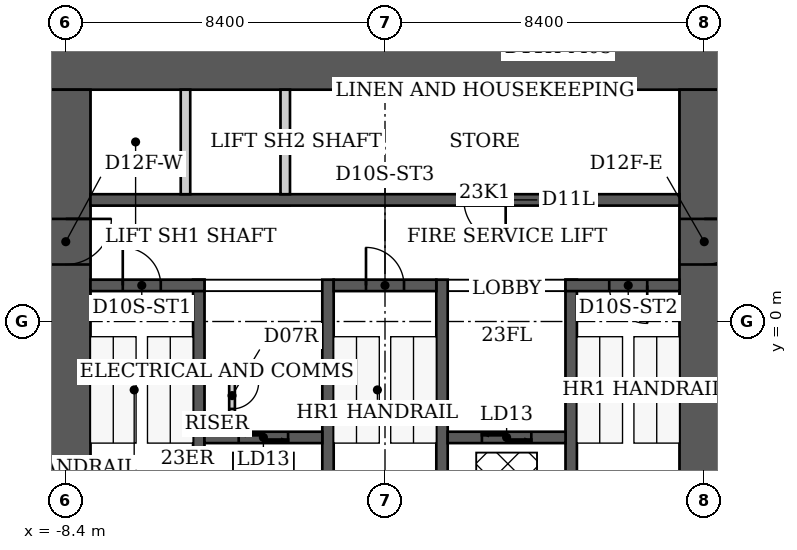
"""IFC4 building model, lengths in metres.
Left out: names, types, materials, properties, quantities, classifications, styles, units other than length and angle.
Written with IfcOpenShell. Run it as: python <this file> out.ifc"""

import sys

from ifc_helpers import new_model, si_unit, direction, frame, frame_2d, origin, place, context, subcontext, project, spatial, rectangle, extrude, element, fill, save


model = new_model("IFC4")
c1 = context("Model", 3, precision=1e-05, world=origin(), true_north=direction((0.0, 1.0)))
c2 = subcontext(c1, "Body", "Model", "MODEL_VIEW")
j1 = project(units=[si_unit("LENGTHUNIT", "METRE"), si_unit("PLANEANGLEUNIT", "RADIAN")], contexts=[c1])
p1 = place(None, origin())
s1 = spatial("IfcSite", under=j1, at=p1, CompositionType="ELEMENT")
p2 = place(p1, origin())
s2 = spatial("IfcBuilding", under=s1, at=p2, CompositionType="ELEMENT")
p3 = place(p2, frame((0.0, 0.0, 96.8)))
s3 = spatial("IfcBuildingStorey", under=s2, at=p3, CompositionType="ELEMENT", Elevation=96.8)
p4 = place(p3, frame((-9.05, 6.75, 0.0), z_axis=(0.0, 0.0, 1.0), x_axis=(1.0, 0.0, 0.0)))
e1 = element("IfcWall", 1, at=p4, inside=s3, PredefinedType="SHEAR", context=c2, shape_type="SweptSolid", body=[
    extrude(rectangle(XDim=18.1, YDim=1.3, at=frame_2d((9.05, 0.0))), origin(), (0.0, 0.0, 1.0), 3.8),
])
p5 = place(p3, frame((-8.4, -9.2, 0.0), z_axis=(0.0, 0.0, 1.0), x_axis=(0.0, 1.0, 0.0)))
e2 = element("IfcWall", 2, at=p5, inside=s3, PredefinedType="SHEAR", context=c2, shape_type="SweptSolid", body=[
    extrude(rectangle(XDim=15.3, YDim=1.3, at=frame_2d((7.65, 0.0))), origin(), (0.0, 0.0, 1.0), 3.8),
])
p6 = place(p5, frame((10.7, 0.0, 0.0)))
e3 = element("IfcOpeningElement", 3, at=p6, cuts=e2, PredefinedType="OPENING", context=c2, shape_type="SweptSolid", body=[
    extrude(rectangle(XDim=1.2, YDim=2.2, at=frame_2d((0.6, 1.1))), frame((0.0, 0.65, 0.0), z_axis=(0.0, -1.0, 0.0), x_axis=(1.0, 0.0, 0.0)), (0.0, 0.0, 1.0), 1.3),
])
p7 = place(p3, frame((8.4, -9.2, 0.0), z_axis=(0.0, 0.0, 1.0), x_axis=(0.0, 1.0, 0.0)))
e4 = element("IfcWall", 4, at=p7, inside=s3, PredefinedType="SHEAR", context=c2, shape_type="SweptSolid", body=[
    extrude(rectangle(XDim=15.3, YDim=1.3, at=frame_2d((7.65, 0.0))), origin(), (0.0, 0.0, 1.0), 3.8),
])
p8 = place(p7, frame((10.7, 0.0, 0.0)))
e5 = element("IfcOpeningElement", 5, at=p8, cuts=e4, PredefinedType="OPENING", context=c2, shape_type="SweptSolid", body=[
    extrude(rectangle(XDim=1.2, YDim=2.2, at=frame_2d((0.6, 1.1))), frame((0.0, 0.65, 0.0), z_axis=(0.0, -1.0, 0.0), x_axis=(1.0, 0.0, 0.0)), (0.0, 0.0, 1.0), 1.3),
])
for number, where, z_axis, x_axis in (
    (6, (-4.9, -6.1, 0.0), (0.0, 0.0, 1.0), (0.0, 1.0, 0.0)),
    (7, (-1.5, -6.1, 0.0), (0.0, 0.0, 1.0), (0.0, 1.0, 0.0)),
    (8, (1.5, -6.1, 0.0), (0.0, 0.0, 1.0), (0.0, 1.0, 0.0)),
    (9, (4.9, -6.1, 0.0), (0.0, 0.0, 1.0), (0.0, 1.0, 0.0)),
):
    element("IfcWall", number, at=place(p3, frame(where, z_axis=z_axis, x_axis=x_axis)), inside=s3, PredefinedType="SHEAR", context=c2, shape_type="SweptSolid", body=[
        extrude(rectangle(XDim=7.2, YDim=0.3, at=frame_2d((3.6, 0.0))), origin(), (0.0, 0.0, 1.0), 3.8),
    ])
p9 = place(p3, frame((-7.75, 0.95, 0.0), z_axis=(0.0, 0.0, 1.0), x_axis=(1.0, 0.0, 0.0)))
e10 = element("IfcWall", 10, at=p9, inside=s3, PredefinedType="SHEAR", context=c2, shape_type="SweptSolid", body=[
    extrude(rectangle(XDim=3.0, YDim=0.3, at=frame_2d((1.5, 0.0))), origin(), (0.0, 0.0, 1.0), 3.8),
])
p10 = place(p9, frame((0.85, 0.0, 0.0)))
e11 = element("IfcOpeningElement", 11, at=p10, cuts=e10, PredefinedType="OPENING", context=c2, shape_type="SweptSolid", body=[
    extrude(rectangle(XDim=1.0, YDim=2.2, at=frame_2d((0.5, 1.1))), frame((0.0, 0.15, 0.0), z_axis=(0.0, -1.0, 0.0), x_axis=(1.0, 0.0, 0.0)), (0.0, 0.0, 1.0), 0.3),
])
p11 = place(p3, frame((-1.35, 0.95, 0.0), z_axis=(0.0, 0.0, 1.0), x_axis=(1.0, 0.0, 0.0)))
e12 = element("IfcWall", 12, at=p11, inside=s3, PredefinedType="SHEAR", context=c2, shape_type="SweptSolid", body=[
    extrude(rectangle(XDim=2.7, YDim=0.3, at=frame_2d((1.35, 0.0))), origin(), (0.0, 0.0, 1.0), 3.8),
])
p12 = place(p11, frame((0.85, 0.0, 0.0)))
e13 = element("IfcOpeningElement", 13, at=p12, cuts=e12, PredefinedType="OPENING", context=c2, shape_type="SweptSolid", body=[
    extrude(rectangle(XDim=1.0, YDim=2.2, at=frame_2d((0.5, 1.1))), frame((0.0, 0.15, 0.0), z_axis=(0.0, -1.0, 0.0), x_axis=(1.0, 0.0, 0.0)), (0.0, 0.0, 1.0), 0.3),
])
p13 = place(p3, frame((4.75, 0.95, 0.0), z_axis=(0.0, 0.0, 1.0), x_axis=(1.0, 0.0, 0.0)))
e14 = element("IfcWall", 14, at=p13, inside=s3, PredefinedType="SHEAR", context=c2, shape_type="SweptSolid", body=[
    extrude(rectangle(XDim=3.0, YDim=0.3, at=frame_2d((1.5, 0.0))), origin(), (0.0, 0.0, 1.0), 3.8),
])
p14 = place(p13, frame((1.15, 0.0, 0.0)))
e15 = element("IfcOpeningElement", 15, at=p14, cuts=e14, PredefinedType="OPENING", context=c2, shape_type="SweptSolid", body=[
    extrude(rectangle(XDim=1.0, YDim=2.2, at=frame_2d((0.5, 1.1))), frame((0.0, 0.15, 0.0), z_axis=(0.0, -1.0, 0.0), x_axis=(1.0, 0.0, 0.0)), (0.0, 0.0, 1.0), 0.3),
])
p15 = place(p3, frame((-4.75, -3.05, 0.0), z_axis=(0.0, 0.0, 1.0), x_axis=(1.0, 0.0, 0.0)))
e16 = element("IfcWall", 16, at=p15, inside=s3, PredefinedType="SHEAR", context=c2, shape_type="SweptSolid", body=[
    extrude(rectangle(XDim=3.1, YDim=0.3, at=frame_2d((1.55, 0.0))), origin(), (0.0, 0.0, 1.0), 3.8),
])
p16 = place(p15, frame((0.9, 0.0, 0.0)))
e17 = element("IfcOpeningElement", 17, at=p16, cuts=e16, PredefinedType="OPENING", context=c2, shape_type="SweptSolid", body=[
    extrude(rectangle(XDim=1.3, YDim=2.1, at=frame_2d((0.65, 1.05))), frame((0.0, 0.15, 0.0), z_axis=(0.0, -1.0, 0.0), x_axis=(1.0, 0.0, 0.0)), (0.0, 0.0, 1.0), 0.3),
])
p17 = place(p3, frame((1.65, -3.05, 0.0), z_axis=(0.0, 0.0, 1.0), x_axis=(1.0, 0.0, 0.0)))
e18 = element("IfcWall", 18, at=p17, inside=s3, PredefinedType="SHEAR", context=c2, shape_type="SweptSolid", body=[
    extrude(rectangle(XDim=3.1, YDim=0.3, at=frame_2d((1.55, 0.0))), origin(), (0.0, 0.0, 1.0), 3.8),
])
p18 = place(p17, frame((0.9, 0.0, 0.0)))
e19 = element("IfcOpeningElement", 19, at=p18, cuts=e18, PredefinedType="OPENING", context=c2, shape_type="SweptSolid", body=[
    extrude(rectangle(XDim=1.3, YDim=2.1, at=frame_2d((0.65, 1.05))), frame((0.0, 0.15, 0.0), z_axis=(0.0, -1.0, 0.0), x_axis=(1.0, 0.0, 0.0)), (0.0, 0.0, 1.0), 0.3),
])
p19 = place(p3, frame((-7.75, 3.2, 0.0), z_axis=(0.0, 0.0, 1.0), x_axis=(1.0, 0.0, 0.0)))
e20 = element("IfcWall", 20, at=p19, inside=s3, PredefinedType="SHEAR", context=c2, shape_type="SweptSolid", body=[
    extrude(rectangle(XDim=15.5, YDim=0.3, at=frame_2d((7.75, 0.0))), origin(), (0.0, 0.0, 1.0), 3.8),
])
p20 = place(p19, frame((9.825, 0.0, 0.0)))
e21 = element("IfcOpeningElement", 21, at=p20, cuts=e20, PredefinedType="OPENING", context=c2, shape_type="SweptSolid", body=[
    extrude(rectangle(XDim=1.1, YDim=2.2, at=frame_2d((0.55, 1.1))), frame((0.0, 0.15, 0.0), z_axis=(0.0, -1.0, 0.0), x_axis=(1.0, 0.0, 0.0)), (0.0, 0.0, 1.0), 0.3),
])
for number, where, z_axis, x_axis in (
    (22, (-5.25, 3.35, 0.0), (0.0, 0.0, 1.0), (0.0, 1.0, 0.0)),
    (23, (-2.625, 3.35, 0.0), (0.0, 0.0, 1.0), (0.0, 1.0, 0.0)),
):
    element("IfcWall", number, at=place(p3, frame(where, z_axis=z_axis, x_axis=x_axis)), inside=s3, PredefinedType="PARTITIONING", context=c2, shape_type="SweptSolid", body=[
        extrude(rectangle(XDim=2.75, YDim=0.25, at=frame_2d((1.375, 0.0))), origin(), (0.0, 0.0, 1.0), 3.8),
    ])
p21 = place(p3, frame((-4.025, -2.9, 0.0), z_axis=(0.0, 0.0, 1.0), x_axis=(0.0, 1.0, 0.0)))
e24 = element("IfcWall", 24, at=p21, inside=s3, PredefinedType="PARTITIONING", context=c2, shape_type="SweptSolid", body=[
    extrude(rectangle(XDim=1.775, YDim=0.15, at=frame_2d((0.887, 0.0))), origin(), (0.0, 0.0, 1.0), 3.64),
])
p22 = place(p21, frame((0.6, 0.0, 0.0)))
e25 = element("IfcOpeningElement", 25, at=p22, cuts=e24, PredefinedType="OPENING", context=c2, shape_type="SweptSolid", body=[
    extrude(rectangle(XDim=0.7, YDim=2.1, at=frame_2d((0.35, 1.05))), frame((0.0, 0.075, 0.0), z_axis=(0.0, -1.0, 0.0), x_axis=(1.0, 0.0, 0.0)), (0.0, 0.0, 1.0), 0.15),
])
p23 = place(p3, frame((-4.75, -1.2, 0.0), z_axis=(0.0, 0.0, 1.0), x_axis=(1.0, 0.0, 0.0)))
e26 = element("IfcWall", 26, at=p23, inside=s3, PredefinedType="PARTITIONING", context=c2, shape_type="SweptSolid", body=[
    extrude(rectangle(XDim=0.8, YDim=0.15, at=frame_2d((0.4, 0.0))), origin(), (0.0, 0.0, 1.0), 3.64),
])
p24 = place(p10, origin())
e27 = element("IfcDoor", 27, at=p24, inside=s3, OperationType="SINGLE_SWING_LEFT", PredefinedType="DOOR", context=c2, shape_type="SweptSolid", body=[
    extrude(rectangle(XDim=1.0, YDim=2.2, at=frame_2d((0.5, 1.1))), frame((0.0, 0.025, 0.0), z_axis=(0.0, -1.0, 0.0), x_axis=(1.0, 0.0, 0.0)), (0.0, 0.0, 1.0), 0.05),
])
fill(e11, e27)
p25 = place(p12, origin())
e28 = element("IfcDoor", 28, at=p25, inside=s3, OperationType="SINGLE_SWING_LEFT", PredefinedType="DOOR", context=c2, shape_type="SweptSolid", body=[
    extrude(rectangle(XDim=1.0, YDim=2.2, at=frame_2d((0.5, 1.1))), frame((0.0, 0.025, 0.0), z_axis=(0.0, -1.0, 0.0), x_axis=(1.0, 0.0, 0.0)), (0.0, 0.0, 1.0), 0.05),
])
fill(e13, e28)
p26 = place(p14, origin())
e29 = element("IfcDoor", 29, at=p26, inside=s3, OperationType="SINGLE_SWING_RIGHT", PredefinedType="DOOR", context=c2, shape_type="SweptSolid", body=[
    extrude(rectangle(XDim=1.0, YDim=2.2, at=frame_2d((0.5, 1.1))), frame((0.0, 0.025, 0.0), z_axis=(0.0, -1.0, 0.0), x_axis=(1.0, 0.0, 0.0)), (0.0, 0.0, 1.0), 0.05),
])
fill(e15, e29)
p27 = place(p6, origin())
e30 = element("IfcDoor", 30, at=p27, inside=s3, OperationType="SINGLE_SWING_RIGHT", PredefinedType="DOOR", context=c2, shape_type="SweptSolid", body=[
    extrude(rectangle(XDim=1.2, YDim=2.2, at=frame_2d((0.6, 1.1))), frame((0.0, 0.025, 0.0), z_axis=(0.0, -1.0, 0.0), x_axis=(1.0, 0.0, 0.0)), (0.0, 0.0, 1.0), 0.05),
])
fill(e3, e30)
p28 = place(p8, origin())
e31 = element("IfcDoor", 31, at=p28, inside=s3, OperationType="SINGLE_SWING_RIGHT", PredefinedType="DOOR", context=c2, shape_type="SweptSolid", body=[
    extrude(rectangle(XDim=1.2, YDim=2.2, at=frame_2d((0.6, 1.1))), frame((0.0, 0.025, 0.0), z_axis=(0.0, -1.0, 0.0), x_axis=(1.0, 0.0, 0.0)), (0.0, 0.0, 1.0), 0.05),
])
fill(e5, e31)
p29 = place(p22, origin())
e32 = element("IfcDoor", 32, at=p29, inside=s3, OperationType="SINGLE_SWING_RIGHT", PredefinedType="DOOR", context=c2, shape_type="SweptSolid", body=[
    extrude(rectangle(XDim=0.7, YDim=2.1, at=frame_2d((0.35, 1.05))), frame((0.0, 0.025, 0.0), z_axis=(0.0, -1.0, 0.0), x_axis=(1.0, 0.0, 0.0)), (0.0, 0.0, 1.0), 0.05),
])
fill(e25, e32)
p30 = place(p20, origin())
e33 = element("IfcDoor", 33, at=p30, inside=s3, OperationType="SINGLE_SWING_RIGHT", PredefinedType="DOOR", context=c2, shape_type="SweptSolid", body=[
    extrude(rectangle(XDim=1.1, YDim=2.2, at=frame_2d((0.55, 1.1))), frame((0.0, 0.025, 0.0), z_axis=(0.0, -1.0, 0.0), x_axis=(1.0, 0.0, 0.0)), (0.0, 0.0, 1.0), 0.05),
])
fill(e21, e33)
p31 = place(p16, origin())
e34 = element("IfcDoor", 34, at=p31, inside=s3, OperationType="DOUBLE_DOOR_SLIDING", PredefinedType="DOOR", context=c2, shape_type="SweptSolid", body=[
    extrude(rectangle(XDim=1.3, YDim=2.1, at=frame_2d((0.65, 1.05))), frame((0.0, 0.025, 0.0), z_axis=(0.0, -1.0, 0.0), x_axis=(1.0, 0.0, 0.0)), (0.0, 0.0, 1.0), 0.05),
])
fill(e17, e34)
p32 = place(p18, origin())
e35 = element("IfcDoor", 35, at=p32, inside=s3, OperationType="DOUBLE_DOOR_SLIDING", PredefinedType="DOOR", context=c2, shape_type="SweptSolid", body=[
    extrude(rectangle(XDim=1.3, YDim=2.1, at=frame_2d((0.65, 1.05))), frame((0.0, 0.025, 0.0), z_axis=(0.0, -1.0, 0.0), x_axis=(1.0, 0.0, 0.0)), (0.0, 0.0, 1.0), 0.05),
])
fill(e19, e35)
save(model, sys.argv[1])
